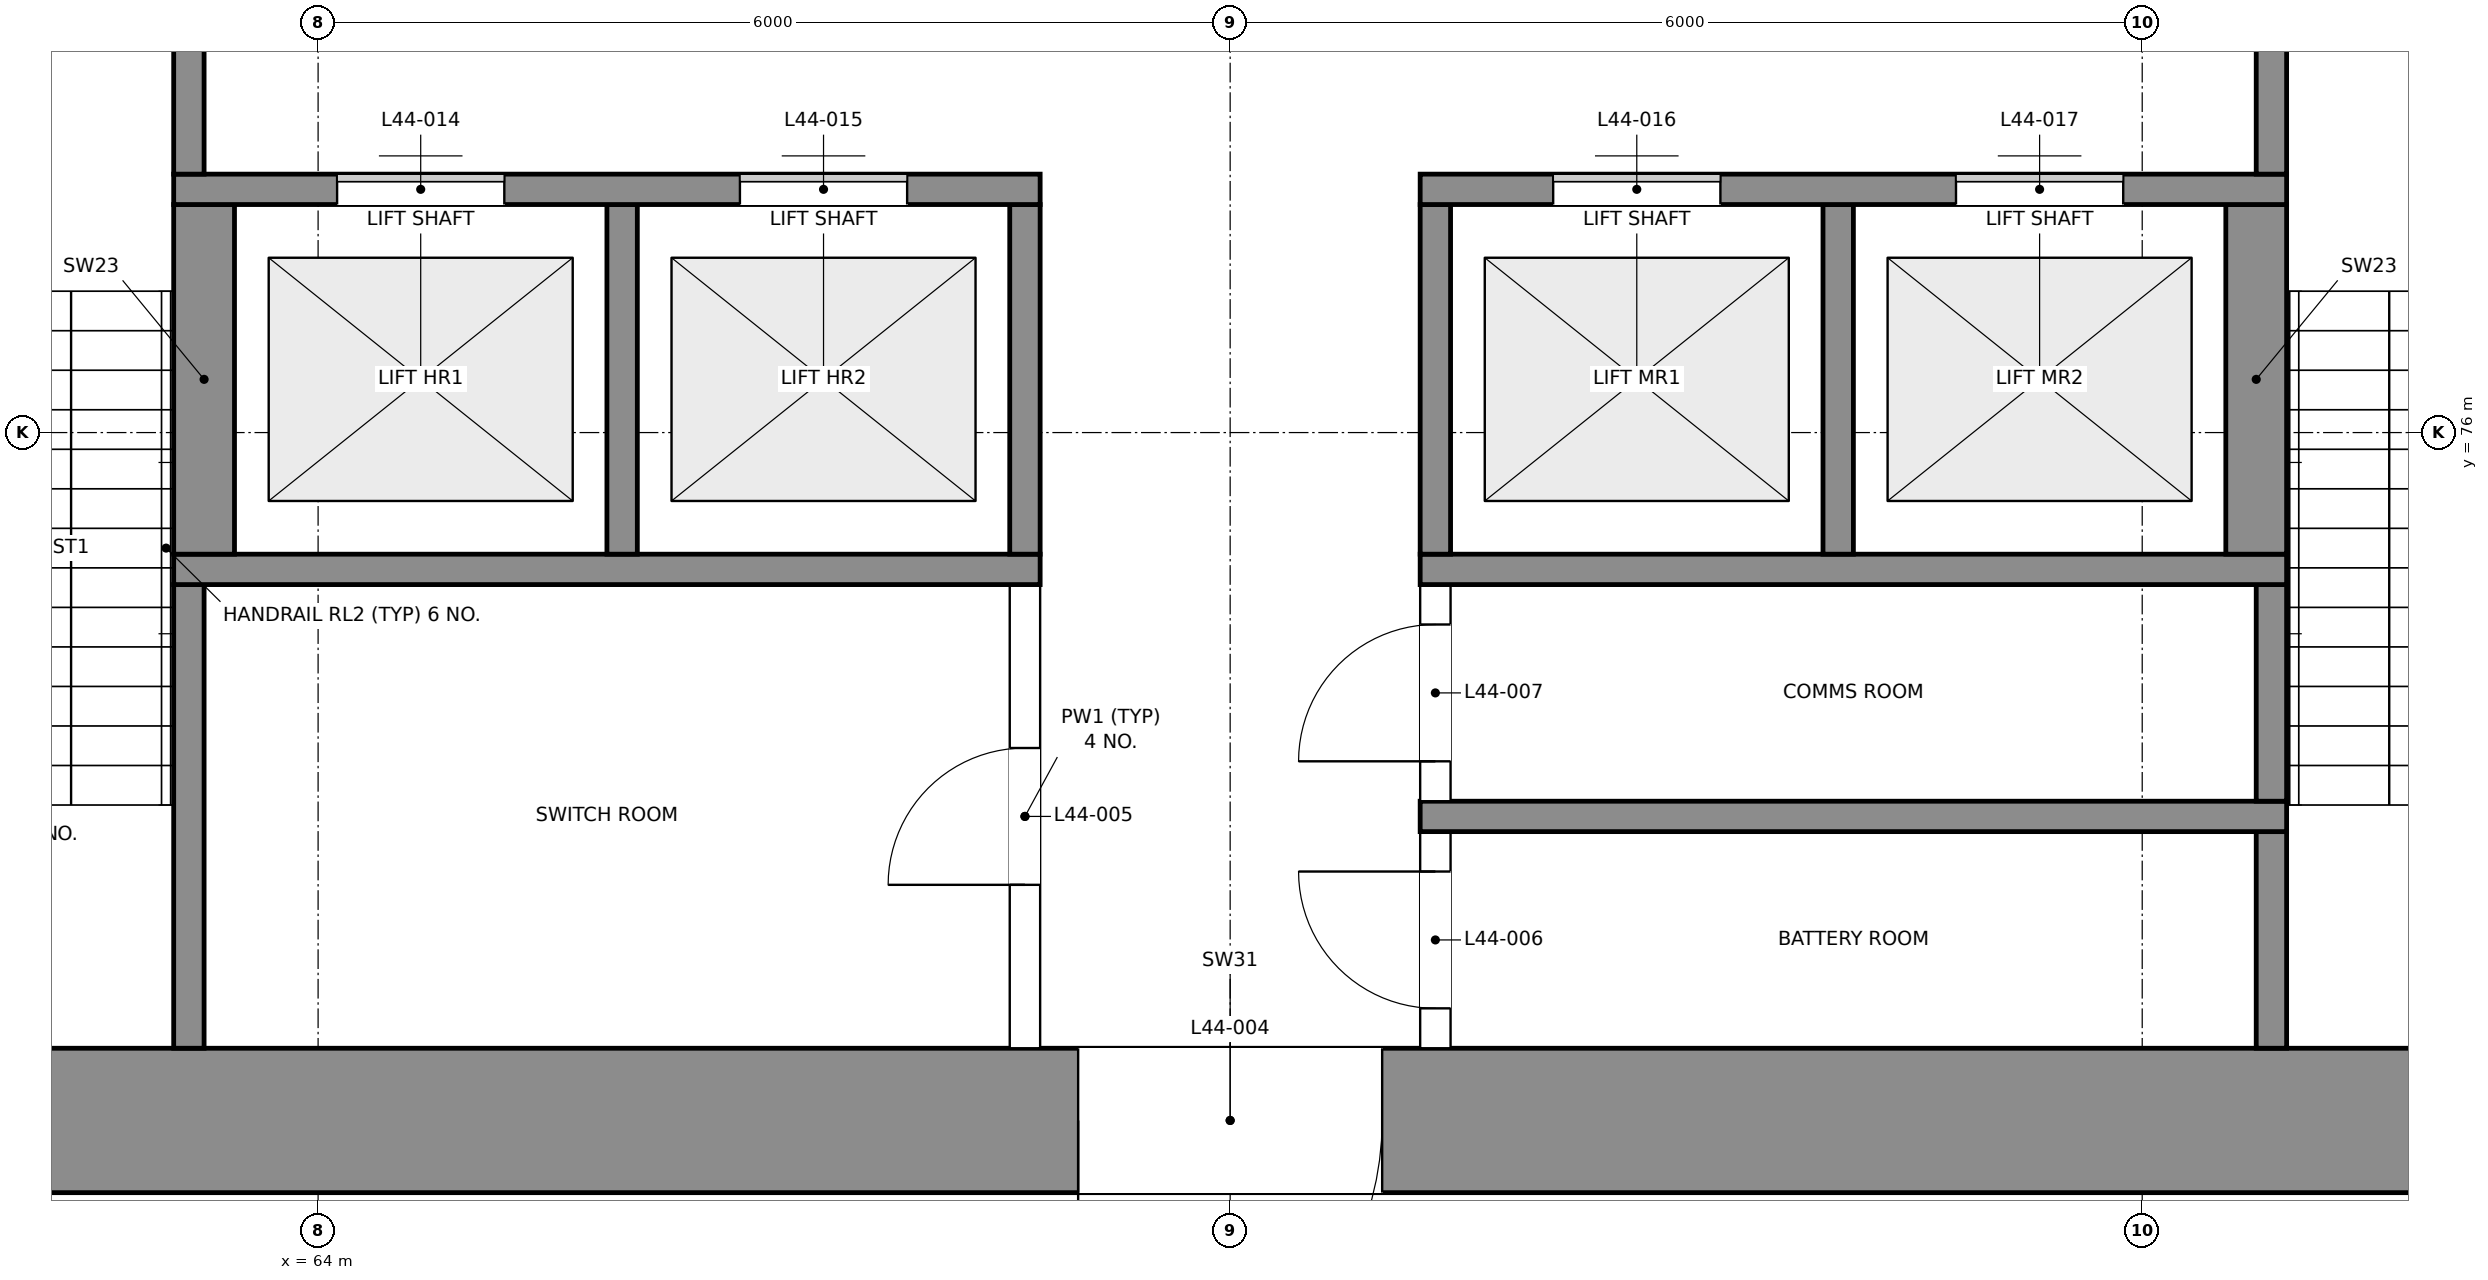
"""IFC4 building model, lengths in metres.
Left out: names, types, materials, properties, quantities, classifications, styles, units other than length and angle.
Written with IfcOpenShell. Run it as: python <this file> out.ifc"""

import sys

from ifc_helpers import new_model, si_unit, direction, frame, frame_2d, origin, place, context, subcontext, project, spatial, rectangle, extrude, element, fill, save


model = new_model("IFC4")
c1 = context("Model", 3, precision=1e-05, world=origin(), true_north=direction((0.0, 1.0)))
c2 = subcontext(c1, "Body", "Model", "MODEL_VIEW")
j1 = project(units=[si_unit("LENGTHUNIT", "METRE"), si_unit("PLANEANGLEUNIT", "RADIAN")], contexts=[c1])
p1 = place(None, origin())
s1 = spatial("IfcSite", under=j1, at=p1, CompositionType="ELEMENT")
p2 = place(p1, origin())
s2 = spatial("IfcBuilding", under=s1, at=p2, CompositionType="ELEMENT")
p3 = place(p2, frame((0.0, 0.0, 191.5)))
s3 = spatial("IfcBuildingStorey", under=s2, at=p3, CompositionType="ELEMENT", Elevation=191.5)
p4 = place(p3, frame((59.0, 71.475, 0.0), z_axis=(0.0, 0.0, 1.0), x_axis=(1.0, 0.0, 0.0)))
e1 = element("IfcWall", 1, at=p4, inside=s3, PredefinedType="SHEAR", context=c2, shape_type="SweptSolid", body=[
    extrude(rectangle(XDim=22.0, YDim=0.95, at=frame_2d((11.0, 0.0))), origin(), (0.0, 0.0, 1.0), 5.0),
])
p5 = place(p4, frame((2.025, 0.0, 0.0)))
e2 = element("IfcOpeningElement", 2, at=p5, cuts=e1, PredefinedType="OPENING", context=c2, shape_type="SweptSolid", body=[
    extrude(rectangle(XDim=1.2, YDim=2.1, at=frame_2d((0.6, 1.05))), frame((0.0, 0.485, 0.0), z_axis=(0.0, -1.0, 0.0), x_axis=(1.0, 0.0, 0.0)), (0.0, 0.0, 1.0), 0.97),
])
p6 = place(p4, frame((18.775, 0.0, 0.0)))
e3 = element("IfcOpeningElement", 3, at=p6, cuts=e1, PredefinedType="OPENING", context=c2, shape_type="SweptSolid", body=[
    extrude(rectangle(XDim=1.2, YDim=2.1, at=frame_2d((0.6, 1.05))), frame((0.0, 0.485, 0.0), z_axis=(0.0, -1.0, 0.0), x_axis=(1.0, 0.0, 0.0)), (0.0, 0.0, 1.0), 0.97),
])
p7 = place(p4, frame((10.0, 0.0, 0.0)))
e4 = element("IfcOpeningElement", 4, at=p7, cuts=e1, PredefinedType="OPENING", context=c2, shape_type="SweptSolid", body=[
    extrude(rectangle(XDim=2.0, YDim=2.1, at=frame_2d((1.0, 1.05))), frame((0.0, 0.485, 0.0), z_axis=(0.0, -1.0, 0.0), x_axis=(1.0, 0.0, 0.0)), (0.0, 0.0, 1.0), 0.97),
])
p8 = place(p3, frame((63.15, 71.95, 0.0), z_axis=(0.0, 0.0, 1.0), x_axis=(0.0, 1.0, 0.0)))
e5 = element("IfcWall", 5, at=p8, inside=s3, PredefinedType="SHEAR", context=c2, shape_type="SweptSolid", body=[
    extrude(rectangle(XDim=3.05, YDim=0.2, at=frame_2d((1.525, 0.0))), origin(), (0.0, 0.0, 1.0), 5.0),
])
p9 = place(p3, frame((68.65, 71.95, 0.0), z_axis=(0.0, 0.0, 1.0), x_axis=(0.0, 1.0, 0.0)))
e6 = element("IfcWall", 6, at=p9, inside=s3, PredefinedType="PARTITIONING", context=c2, shape_type="SweptSolid", body=[
    extrude(rectangle(XDim=3.05, YDim=0.2, at=frame_2d((1.525, 0.0))), origin(), (0.0, 0.0, 1.0), 4.7),
])
p10 = place(p9, frame((1.075, 0.0, 0.0)))
e7 = element("IfcOpeningElement", 7, at=p10, cuts=e6, PredefinedType="OPENING", context=c2, shape_type="SweptSolid", body=[
    extrude(rectangle(XDim=0.9, YDim=2.1, at=frame_2d((0.45, 1.05))), frame((0.0, 0.11, 0.0), z_axis=(0.0, -1.0, 0.0), x_axis=(1.0, 0.0, 0.0)), (0.0, 0.0, 1.0), 0.22),
])
p11 = place(p3, frame((71.35, 71.95, 0.0), z_axis=(0.0, 0.0, 1.0), x_axis=(0.0, 1.0, 0.0)))
e8 = element("IfcWall", 8, at=p11, inside=s3, PredefinedType="PARTITIONING", context=c2, shape_type="SweptSolid", body=[
    extrude(rectangle(XDim=1.425, YDim=0.2, at=frame_2d((0.712, 0.0))), origin(), (0.0, 0.0, 1.0), 4.7),
])
p12 = place(p11, frame((0.262, 0.0, 0.0)))
e9 = element("IfcOpeningElement", 9, at=p12, cuts=e8, PredefinedType="OPENING", context=c2, shape_type="SweptSolid", body=[
    extrude(rectangle(XDim=0.9, YDim=2.1, at=frame_2d((0.45, 1.05))), frame((0.0, 0.11, 0.0), z_axis=(0.0, -1.0, 0.0), x_axis=(1.0, 0.0, 0.0)), (0.0, 0.0, 1.0), 0.22),
])
p13 = place(p3, frame((76.85, 71.95, 0.0), z_axis=(0.0, 0.0, 1.0), x_axis=(0.0, 1.0, 0.0)))
e10 = element("IfcWall", 10, at=p13, inside=s3, PredefinedType="SHEAR", context=c2, shape_type="SweptSolid", body=[
    extrude(rectangle(XDim=1.425, YDim=0.2, at=frame_2d((0.712, 0.0))), origin(), (0.0, 0.0, 1.0), 5.0),
])
p14 = place(p3, frame((71.25, 73.475, 0.0), z_axis=(0.0, 0.0, 1.0), x_axis=(1.0, 0.0, 0.0)))
e11 = element("IfcWall", 11, at=p14, inside=s3, PredefinedType="SHEAR", context=c2, shape_type="SweptSolid", body=[
    extrude(rectangle(XDim=5.7, YDim=0.2, at=frame_2d((2.85, 0.0))), origin(), (0.0, 0.0, 1.0), 5.0),
])
p15 = place(p3, frame((71.35, 73.575, 0.0), z_axis=(0.0, 0.0, 1.0), x_axis=(0.0, 1.0, 0.0)))
e12 = element("IfcWall", 12, at=p15, inside=s3, PredefinedType="PARTITIONING", context=c2, shape_type="SweptSolid", body=[
    extrude(rectangle(XDim=1.425, YDim=0.2, at=frame_2d((0.712, 0.0))), origin(), (0.0, 0.0, 1.0), 4.7),
])
p16 = place(p15, frame((0.262, 0.0, 0.0)))
e13 = element("IfcOpeningElement", 13, at=p16, cuts=e12, PredefinedType="OPENING", context=c2, shape_type="SweptSolid", body=[
    extrude(rectangle(XDim=0.9, YDim=2.1, at=frame_2d((0.45, 1.05))), frame((0.0, 0.11, 0.0), z_axis=(0.0, -1.0, 0.0), x_axis=(1.0, 0.0, 0.0)), (0.0, 0.0, 1.0), 0.22),
])
p17 = place(p3, frame((76.85, 73.575, 0.0), z_axis=(0.0, 0.0, 1.0), x_axis=(0.0, 1.0, 0.0)))
e14 = element("IfcWall", 14, at=p17, inside=s3, PredefinedType="SHEAR", context=c2, shape_type="SweptSolid", body=[
    extrude(rectangle(XDim=1.425, YDim=0.2, at=frame_2d((0.712, 0.0))), origin(), (0.0, 0.0, 1.0), 5.0),
])
for number, where, z_axis, x_axis in (
    (15, (63.05, 75.1, 0.0), (0.0, 0.0, 1.0), (1.0, 0.0, 0.0)),
    (16, (71.25, 75.1, 0.0), (0.0, 0.0, 1.0), (1.0, 0.0, 0.0)),
):
    element("IfcWall", number, at=place(p3, frame(where, z_axis=z_axis, x_axis=x_axis)), inside=s3, PredefinedType="SHEAR", context=c2, shape_type="SweptSolid", body=[
        extrude(rectangle(XDim=5.7, YDim=0.2, at=frame_2d((2.85, 0.0))), origin(), (0.0, 0.0, 1.0), 5.0),
    ])
p18 = place(p3, frame((63.25, 75.2, 0.0), z_axis=(0.0, 0.0, 1.0), x_axis=(0.0, 1.0, 0.0)))
e17 = element("IfcWall", 17, at=p18, inside=s3, PredefinedType="SHEAR", context=c2, shape_type="SweptSolid", body=[
    extrude(rectangle(XDim=2.3, YDim=0.4, at=frame_2d((1.15, 0.0))), origin(), (0.0, 0.0, 1.0), 5.0),
])
for number, where, z_axis, x_axis in (
    (18, (66.0, 75.2, 0.0), (0.0, 0.0, 1.0), (0.0, 1.0, 0.0)),
    (19, (68.65, 75.2, 0.0), (0.0, 0.0, 1.0), (0.0, 1.0, 0.0)),
    (20, (71.35, 75.2, 0.0), (0.0, 0.0, 1.0), (0.0, 1.0, 0.0)),
    (21, (74.0, 75.2, 0.0), (0.0, 0.0, 1.0), (0.0, 1.0, 0.0)),
):
    element("IfcWall", number, at=place(p3, frame(where, z_axis=z_axis, x_axis=x_axis)), inside=s3, PredefinedType="SHEAR", context=c2, shape_type="SweptSolid", body=[
        extrude(rectangle(XDim=2.3, YDim=0.2, at=frame_2d((1.15, 0.0))), origin(), (0.0, 0.0, 1.0), 5.0),
    ])
p19 = place(p3, frame((76.75, 75.2, 0.0), z_axis=(0.0, 0.0, 1.0), x_axis=(0.0, 1.0, 0.0)))
e22 = element("IfcWall", 22, at=p19, inside=s3, PredefinedType="SHEAR", context=c2, shape_type="SweptSolid", body=[
    extrude(rectangle(XDim=2.3, YDim=0.4, at=frame_2d((1.15, 0.0))), origin(), (0.0, 0.0, 1.0), 5.0),
])
p20 = place(p3, frame((63.05, 77.6, 0.0), z_axis=(0.0, 0.0, 1.0), x_axis=(1.0, 0.0, 0.0)))
e23 = element("IfcWall", 23, at=p20, inside=s3, PredefinedType="SHEAR", context=c2, shape_type="SweptSolid", body=[
    extrude(rectangle(XDim=5.7, YDim=0.2, at=frame_2d((2.85, 0.0))), origin(), (0.0, 0.0, 1.0), 5.0),
])
p21 = place(p20, frame((1.075, 0.0, 0.0)))
e24 = element("IfcOpeningElement", 24, at=p21, cuts=e23, PredefinedType="OPENING", context=c2, shape_type="SweptSolid", body=[
    extrude(rectangle(XDim=1.1, YDim=2.1, at=frame_2d((0.55, 1.05))), frame((0.0, 0.11, 0.0), z_axis=(0.0, -1.0, 0.0), x_axis=(1.0, 0.0, 0.0)), (0.0, 0.0, 1.0), 0.22),
])
p22 = place(p20, frame((3.725, 0.0, 0.0)))
e25 = element("IfcOpeningElement", 25, at=p22, cuts=e23, PredefinedType="OPENING", context=c2, shape_type="SweptSolid", body=[
    extrude(rectangle(XDim=1.1, YDim=2.1, at=frame_2d((0.55, 1.05))), frame((0.0, 0.11, 0.0), z_axis=(0.0, -1.0, 0.0), x_axis=(1.0, 0.0, 0.0)), (0.0, 0.0, 1.0), 0.22),
])
p23 = place(p3, frame((71.25, 77.6, 0.0), z_axis=(0.0, 0.0, 1.0), x_axis=(1.0, 0.0, 0.0)))
e26 = element("IfcWall", 26, at=p23, inside=s3, PredefinedType="SHEAR", context=c2, shape_type="SweptSolid", body=[
    extrude(rectangle(XDim=5.7, YDim=0.2, at=frame_2d((2.85, 0.0))), origin(), (0.0, 0.0, 1.0), 5.0),
])
p24 = place(p23, frame((0.875, 0.0, 0.0)))
e27 = element("IfcOpeningElement", 27, at=p24, cuts=e26, PredefinedType="OPENING", context=c2, shape_type="SweptSolid", body=[
    extrude(rectangle(XDim=1.1, YDim=2.1, at=frame_2d((0.55, 1.05))), frame((0.0, 0.11, 0.0), z_axis=(0.0, -1.0, 0.0), x_axis=(1.0, 0.0, 0.0)), (0.0, 0.0, 1.0), 0.22),
])
p25 = place(p23, frame((3.525, 0.0, 0.0)))
e28 = element("IfcOpeningElement", 28, at=p25, cuts=e26, PredefinedType="OPENING", context=c2, shape_type="SweptSolid", body=[
    extrude(rectangle(XDim=1.1, YDim=2.1, at=frame_2d((0.55, 1.05))), frame((0.0, 0.11, 0.0), z_axis=(0.0, -1.0, 0.0), x_axis=(1.0, 0.0, 0.0)), (0.0, 0.0, 1.0), 0.22),
])
for number, where, z_axis, x_axis in (
    (29, (63.15, 77.7, 0.0), (0.0, 0.0, 1.0), (0.0, 1.0, 0.0)),
    (30, (76.85, 77.7, 0.0), (0.0, 0.0, 1.0), (0.0, 1.0, 0.0)),
):
    element("IfcWall", number, at=place(p3, frame(where, z_axis=z_axis, x_axis=x_axis)), inside=s3, PredefinedType="SHEAR", context=c2, shape_type="SweptSolid", body=[
        extrude(rectangle(XDim=3.2, YDim=0.2, at=frame_2d((1.6, 0.0))), origin(), (0.0, 0.0, 1.0), 5.0),
    ])
p26 = place(p7, frame((2.0, 0.0, 0.0), z_axis=(0.0, 0.0, 1.0), x_axis=(-1.0, 0.0, 0.0)))
e31 = element("IfcDoor", 31, at=p26, inside=s3, OperationType="DOUBLE_DOOR_SINGLE_SWING", PredefinedType="DOOR", context=c2, shape_type="SweptSolid", body=[
    extrude(rectangle(XDim=2.0, YDim=2.1, at=frame_2d((1.0, 1.05))), frame((0.0, 0.025, 0.0), z_axis=(0.0, -1.0, 0.0), x_axis=(1.0, 0.0, 0.0)), (0.0, 0.0, 1.0), 0.05),
])
fill(e4, e31)
p27 = place(p10, origin())
e32 = element("IfcDoor", 32, at=p27, inside=s3, OperationType="SINGLE_SWING_LEFT", PredefinedType="DOOR", context=c2, shape_type="SweptSolid", body=[
    extrude(rectangle(XDim=0.9, YDim=2.1, at=frame_2d((0.45, 1.05))), frame((0.0, 0.025, 0.0), z_axis=(0.0, -1.0, 0.0), x_axis=(1.0, 0.0, 0.0)), (0.0, 0.0, 1.0), 0.05),
])
fill(e7, e32)
p28 = place(p12, origin())
e33 = element("IfcDoor", 33, at=p28, inside=s3, OperationType="SINGLE_SWING_RIGHT", PredefinedType="DOOR", context=c2, shape_type="SweptSolid", body=[
    extrude(rectangle(XDim=0.9, YDim=2.1, at=frame_2d((0.45, 1.05))), frame((0.0, 0.025, 0.0), z_axis=(0.0, -1.0, 0.0), x_axis=(1.0, 0.0, 0.0)), (0.0, 0.0, 1.0), 0.05),
])
fill(e9, e33)
p29 = place(p16, origin())
e34 = element("IfcDoor", 34, at=p29, inside=s3, OperationType="SINGLE_SWING_LEFT", PredefinedType="DOOR", context=c2, shape_type="SweptSolid", body=[
    extrude(rectangle(XDim=0.9, YDim=2.1, at=frame_2d((0.45, 1.05))), frame((0.0, 0.025, 0.0), z_axis=(0.0, -1.0, 0.0), x_axis=(1.0, 0.0, 0.0)), (0.0, 0.0, 1.0), 0.05),
])
fill(e13, e34)
p30 = place(p21, origin())
e35 = element("IfcDoor", 35, at=p30, inside=s3, OperationType="DOUBLE_DOOR_SLIDING", PredefinedType="DOOR", context=c2, shape_type="SweptSolid", body=[
    extrude(rectangle(XDim=1.1, YDim=2.1, at=frame_2d((0.55, 1.05))), frame((0.0, 0.025, 0.0), z_axis=(0.0, -1.0, 0.0), x_axis=(1.0, 0.0, 0.0)), (0.0, 0.0, 1.0), 0.05),
])
fill(e24, e35)
p31 = place(p22, origin())
e36 = element("IfcDoor", 36, at=p31, inside=s3, OperationType="DOUBLE_DOOR_SLIDING", PredefinedType="DOOR", context=c2, shape_type="SweptSolid", body=[
    extrude(rectangle(XDim=1.1, YDim=2.1, at=frame_2d((0.55, 1.05))), frame((0.0, 0.025, 0.0), z_axis=(0.0, -1.0, 0.0), x_axis=(1.0, 0.0, 0.0)), (0.0, 0.0, 1.0), 0.05),
])
fill(e25, e36)
p32 = place(p24, origin())
e37 = element("IfcDoor", 37, at=p32, inside=s3, OperationType="DOUBLE_DOOR_SLIDING", PredefinedType="DOOR", context=c2, shape_type="SweptSolid", body=[
    extrude(rectangle(XDim=1.1, YDim=2.1, at=frame_2d((0.55, 1.05))), frame((0.0, 0.025, 0.0), z_axis=(0.0, -1.0, 0.0), x_axis=(1.0, 0.0, 0.0)), (0.0, 0.0, 1.0), 0.05),
])
fill(e27, e37)
p33 = place(p25, origin())
e38 = element("IfcDoor", 38, at=p33, inside=s3, OperationType="DOUBLE_DOOR_SLIDING", PredefinedType="DOOR", context=c2, shape_type="SweptSolid", body=[
    extrude(rectangle(XDim=1.1, YDim=2.1, at=frame_2d((0.55, 1.05))), frame((0.0, 0.025, 0.0), z_axis=(0.0, -1.0, 0.0), x_axis=(1.0, 0.0, 0.0)), (0.0, 0.0, 1.0), 0.05),
])
fill(e28, e38)
save(model, sys.argv[1])
